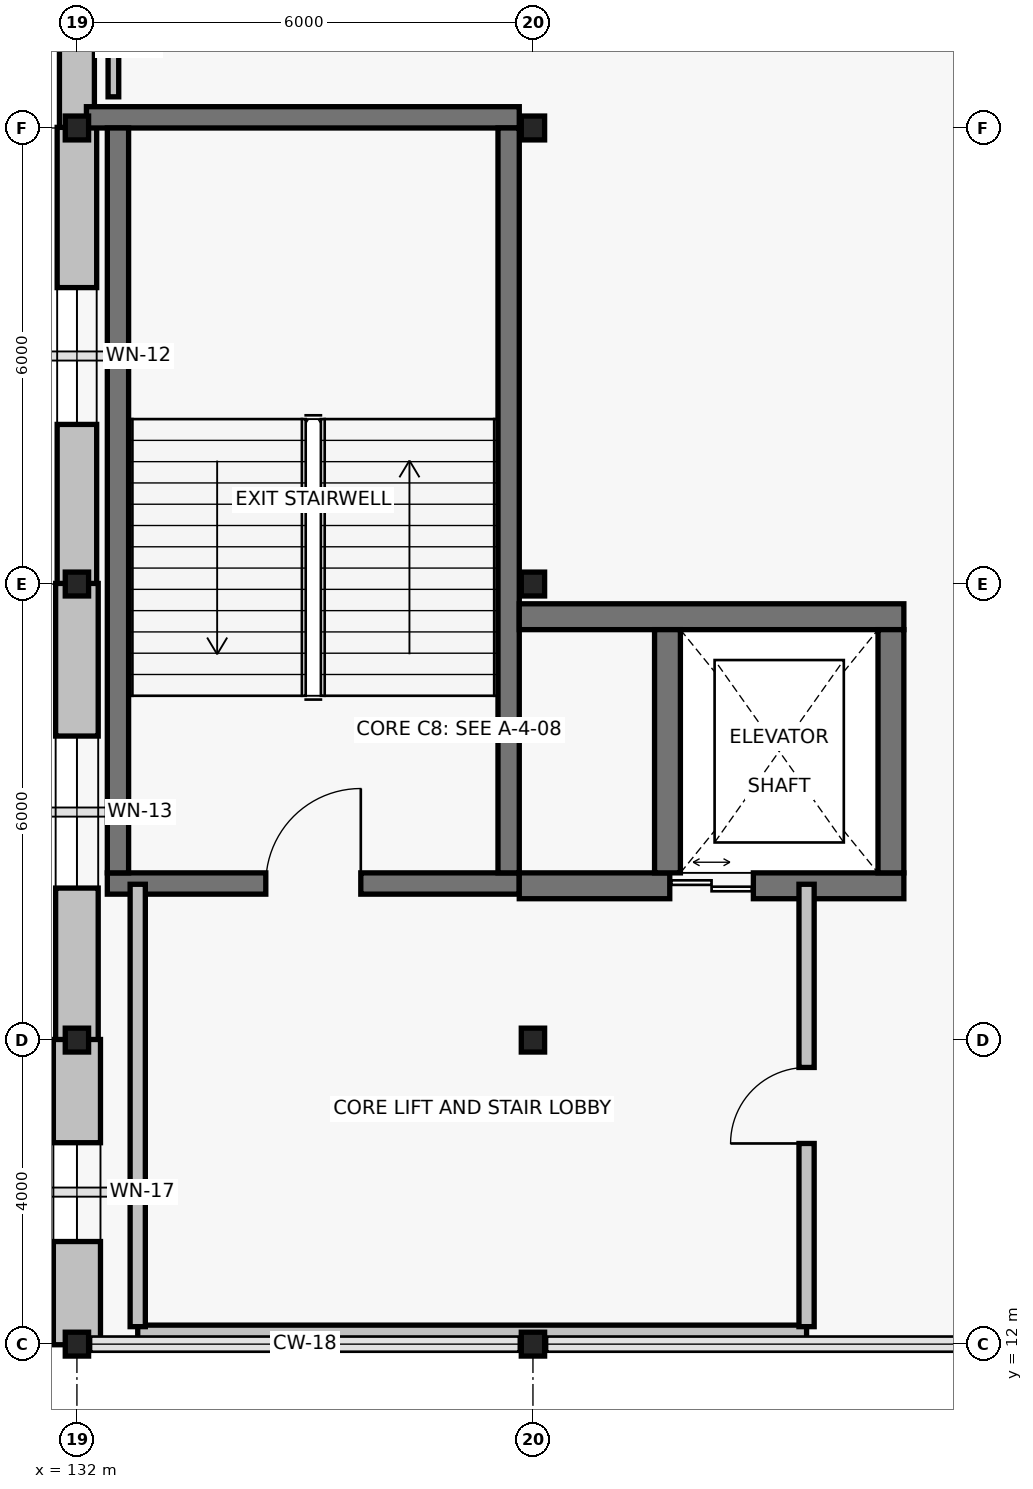
"""IFC4 building model, lengths in metres.
Left out: names, types, materials, properties, quantities, classifications, styles, units other than length and angle.
Written with IfcOpenShell. Run it as: python <this file> out.ifc"""

import sys

from ifc_helpers import new_model, si_unit, direction, frame, frame_2d, origin, origin_2d, place, context, subcontext, project, spatial, rectangle, i_section, extrude, element, fill, save


model = new_model("IFC4")
c1 = context("Model", 3, precision=1e-05, world=origin(), true_north=direction((0.0, 1.0)))
c2 = subcontext(c1, "Body", "Model", "MODEL_VIEW")
j1 = project(units=[si_unit("LENGTHUNIT", "METRE"), si_unit("PLANEANGLEUNIT", "RADIAN")], contexts=[c1])
p1 = place(None, origin())
s1 = spatial("IfcSite", under=j1, at=p1, CompositionType="ELEMENT")
p2 = place(p1, origin())
s2 = spatial("IfcBuilding", under=s1, at=p2, CompositionType="ELEMENT")
p3 = place(p2, frame((0.0, 0.0, 6.6)))
s3 = spatial("IfcBuildingStorey", under=s2, at=p3, CompositionType="ELEMENT", Elevation=6.6)
for number, where, z_axis, x_axis in (
    (1, (132.0, 12.0, 0.0), (0.0, 0.0, 1.0), (1.0, 0.0, 0.0)),
    (2, (132.0, 16.0, 0.0), (0.0, 0.0, 1.0), (1.0, 0.0, 0.0)),
    (3, (132.0, 22.0, 0.0), (0.0, 0.0, 1.0), (1.0, 0.0, 0.0)),
    (4, (132.0, 28.0, 0.0), (0.0, 0.0, 1.0), (1.0, 0.0, 0.0)),
    (5, (138.0, 12.0, 0.0), (0.0, 0.0, 1.0), (1.0, 0.0, 0.0)),
    (6, (138.0, 16.0, 0.0), (0.0, 0.0, 1.0), (1.0, 0.0, 0.0)),
    (7, (138.0, 22.0, 0.0), (0.0, 0.0, 1.0), (1.0, 0.0, 0.0)),
    (8, (138.0, 28.0, 0.0), (0.0, 0.0, 1.0), (1.0, 0.0, 0.0)),
):
    element("IfcColumn", number, at=place(p3, frame(where, z_axis=z_axis, x_axis=x_axis)), inside=s3, PredefinedType="COLUMN", context=c2, shape_type="SweptSolid", body=[
        extrude(i_section(OverallWidth=0.307, OverallDepth=0.314, WebThickness=0.012, FlangeThickness=0.019, FilletRadius=0.014, at=origin_2d()), origin(), (0.0, 0.0, 1.0), 4.8),
    ])
p4 = place(p3, frame((132.0, 34.008, 0.0), z_axis=(0.0, 0.0, 1.0), x_axis=(0.0, -1.0, 0.0)))
e9 = element("IfcWall", 9, at=p4, inside=s3, PredefinedType="SOLIDWALL", context=c2, shape_type="SweptSolid", body=[
    extrude(rectangle(XDim=6.016, YDim=0.46, at=frame_2d((3.008, 0.0))), origin(), (0.0, 0.0, 1.0), 3.911),
])
p5 = place(p4, frame((2.208, 0.0, 0.9)))
e10 = element("IfcOpeningElement", 10, at=p5, cuts=e9, PredefinedType="OPENING", context=c2, shape_type="SweptSolid", body=[
    extrude(rectangle(XDim=1.6, YDim=2.1, at=frame_2d((0.8, 1.05))), frame((0.0, 0.245, 0.0), z_axis=(0.0, -1.0, 0.0), x_axis=(1.0, 0.0, 0.0)), (0.0, 0.0, 1.0), 0.49),
])
p6 = place(p3, frame((132.0, 28.008, 0.0), z_axis=(0.0, 0.0, 1.0), x_axis=(0.0, -1.0, 0.0)))
e11 = element("IfcWall", 11, at=p6, inside=s3, PredefinedType="SOLIDWALL", context=c2, shape_type="SweptSolid", body=[
    extrude(rectangle(XDim=6.016, YDim=0.52, at=frame_2d((3.008, 0.0))), origin(), (0.0, 0.0, 1.0), 3.911),
])
p7 = place(p6, frame((2.108, 0.0, 0.9)))
e12 = element("IfcOpeningElement", 12, at=p7, cuts=e11, PredefinedType="OPENING", context=c2, shape_type="SweptSolid", body=[
    extrude(rectangle(XDim=1.8, YDim=2.1, at=frame_2d((0.9, 1.05))), frame((0.0, 0.275, 0.0), z_axis=(0.0, -1.0, 0.0), x_axis=(1.0, 0.0, 0.0)), (0.0, 0.0, 1.0), 0.55),
])
p8 = place(p3, frame((132.0, 22.008, 0.0), z_axis=(0.0, 0.0, 1.0), x_axis=(0.0, -1.0, 0.0)))
e13 = element("IfcWall", 13, at=p8, inside=s3, PredefinedType="SOLIDWALL", context=c2, shape_type="SweptSolid", body=[
    extrude(rectangle(XDim=6.016, YDim=0.56, at=frame_2d((3.008, 0.0))), origin(), (0.0, 0.0, 1.0), 3.911),
])
p9 = place(p8, frame((2.008, 0.0, 0.9)))
e14 = element("IfcOpeningElement", 14, at=p9, cuts=e13, PredefinedType="OPENING", context=c2, shape_type="SweptSolid", body=[
    extrude(rectangle(XDim=2.0, YDim=2.1, at=frame_2d((1.0, 1.05))), frame((0.0, 0.295, 0.0), z_axis=(0.0, -1.0, 0.0), x_axis=(1.0, 0.0, 0.0)), (0.0, 0.0, 1.0), 0.59),
])
p10 = place(p3, frame((132.0, 16.008, 0.0), z_axis=(0.0, 0.0, 1.0), x_axis=(0.0, -1.0, 0.0)))
e15 = element("IfcWall", 15, at=p10, inside=s3, PredefinedType="SOLIDWALL", context=c2, shape_type="SweptSolid", body=[
    extrude(rectangle(XDim=4.016, YDim=0.62, at=frame_2d((2.008, 0.0))), origin(), (0.0, 0.0, 1.0), 3.911),
])
p11 = place(p10, frame((1.358, 0.0, 0.9)))
e16 = element("IfcOpeningElement", 16, at=p11, cuts=e15, PredefinedType="OPENING", context=c2, shape_type="SweptSolid", body=[
    extrude(rectangle(XDim=1.3, YDim=2.4, at=frame_2d((0.65, 1.2))), frame((0.0, 0.325, 0.0), z_axis=(0.0, -1.0, 0.0), x_axis=(1.0, 0.0, 0.0)), (0.0, 0.0, 1.0), 0.65),
])
p12 = place(p3, frame((132.4, 18.06, 0.0), z_axis=(0.0, 0.0, 1.0), x_axis=(1.0, 0.0, 0.0)))
e17 = element("IfcWall", 17, at=p12, inside=s3, PredefinedType="SHEAR", context=c2, shape_type="SweptSolid", body=[
    extrude(rectangle(XDim=5.42, YDim=0.28, at=frame_2d((2.71, 0.0))), origin(), (0.0, 0.0, 1.0), 4.54),
])
p13 = place(p12, frame((2.085, 0.0, 0.0)))
e18 = element("IfcOpeningElement", 18, at=p13, cuts=e17, PredefinedType="OPENING", context=c2, shape_type="SweptSolid", body=[
    extrude(rectangle(XDim=1.25, YDim=2.2, at=frame_2d((0.625, 1.1))), frame((0.0, 0.155, 0.0), z_axis=(0.0, -1.0, 0.0), x_axis=(1.0, 0.0, 0.0)), (0.0, 0.0, 1.0), 0.31),
])
p14 = place(p3, frame((137.82, 28.14, 0.0), z_axis=(0.0, 0.0, 1.0), x_axis=(-1.0, 0.0, 0.0)))
e19 = element("IfcWall", 19, at=p14, inside=s3, PredefinedType="SHEAR", context=c2, shape_type="SweptSolid", body=[
    extrude(rectangle(XDim=5.695, YDim=0.28, at=frame_2d((2.848, 0.0))), origin(), (0.0, 0.0, 1.0), 4.54),
])
for number, where, z_axis, x_axis in (
    (20, (132.54, 28.0, 0.0), (0.0, 0.0, 1.0), (0.0, -1.0, 0.0)),
    (21, (137.68, 18.2, 0.0), (0.0, 0.0, 1.0), (0.0, 1.0, 0.0)),
):
    element("IfcWall", number, at=place(p3, frame(where, z_axis=z_axis, x_axis=x_axis)), inside=s3, PredefinedType="SHEAR", context=c2, shape_type="SweptSolid", body=[
        extrude(rectangle(XDim=9.8, YDim=0.28, at=frame_2d((4.9, 0.0))), origin(), (0.0, 0.0, 1.0), 4.54),
    ])
p15 = place(p3, frame((137.82, 18.03, 0.0), z_axis=(0.0, 0.0, 1.0), x_axis=(1.0, 0.0, 0.0)))
e22 = element("IfcWall", 22, at=p15, inside=s3, PredefinedType="SHEAR", context=c2, shape_type="SweptSolid", body=[
    extrude(rectangle(XDim=5.06, YDim=0.34, at=frame_2d((2.53, 0.0))), origin(), (0.0, 0.0, 1.0), 4.54),
])
p16 = place(p15, frame((1.98, 0.0, 0.0)))
e23 = element("IfcOpeningElement", 23, at=p16, cuts=e22, PredefinedType="OPENING", context=c2, shape_type="SweptSolid", body=[
    extrude(rectangle(XDim=1.1, YDim=2.2, at=frame_2d((0.55, 1.1))), frame((0.0, 0.185, 0.0), z_axis=(0.0, -1.0, 0.0), x_axis=(1.0, 0.0, 0.0)), (0.0, 0.0, 1.0), 0.37),
])
p17 = place(p3, frame((142.88, 21.57, 0.0), z_axis=(0.0, 0.0, 1.0), x_axis=(-1.0, 0.0, 0.0)))
e24 = element("IfcWall", 24, at=p17, inside=s3, PredefinedType="SHEAR", context=c2, shape_type="SweptSolid", body=[
    extrude(rectangle(XDim=5.06, YDim=0.34, at=frame_2d((2.53, 0.0))), origin(), (0.0, 0.0, 1.0), 4.54),
])
for number, where, z_axis, x_axis in (
    (25, (139.77, 21.4, 0.0), (0.0, 0.0, 1.0), (0.0, -1.0, 0.0)),
    (26, (142.71, 18.2, 0.0), (0.0, 0.0, 1.0), (0.0, 1.0, 0.0)),
):
    element("IfcWall", number, at=place(p3, frame(where, z_axis=z_axis, x_axis=x_axis)), inside=s3, PredefinedType="SHEAR", context=c2, shape_type="SweptSolid", body=[
        extrude(rectangle(XDim=3.2, YDim=0.34, at=frame_2d((1.6, 0.0))), origin(), (0.0, 0.0, 1.0), 4.54),
    ])
p18 = place(p3, frame((132.8, 12.15, 0.0), z_axis=(0.0, 0.0, 1.0), x_axis=(1.0, 0.0, 0.0)))
e27 = element("IfcWall", 27, at=p18, inside=s3, PredefinedType="PARTITIONING", context=c2, shape_type="SweptSolid", body=[
    extrude(rectangle(XDim=8.8, YDim=0.2, at=frame_2d((4.4, 0.0))), origin(), (0.0, 0.0, 1.0), 4.04),
])
p19 = place(p3, frame((132.8, 18.05, 0.0), z_axis=(0.0, 0.0, 1.0), x_axis=(0.0, -1.0, 0.0)))
e28 = element("IfcWall", 28, at=p19, inside=s3, PredefinedType="PARTITIONING", context=c2, shape_type="SweptSolid", body=[
    extrude(rectangle(XDim=5.82, YDim=0.2, at=frame_2d((2.91, 0.0))), origin(), (0.0, 0.0, 1.0), 4.04),
])
p20 = place(p3, frame((141.6, 12.23, 0.0), z_axis=(0.0, 0.0, 1.0), x_axis=(0.0, 1.0, 0.0)))
e29 = element("IfcWall", 29, at=p20, inside=s3, PredefinedType="PARTITIONING", context=c2, shape_type="SweptSolid", body=[
    extrude(rectangle(XDim=5.82, YDim=0.2, at=frame_2d((2.91, 0.0))), origin(), (0.0, 0.0, 1.0), 4.094),
])
p21 = place(p20, frame((2.41, 0.0, 0.0)))
e30 = element("IfcOpeningElement", 30, at=p21, cuts=e29, PredefinedType="OPENING", context=c2, shape_type="SweptSolid", body=[
    extrude(rectangle(XDim=1.0, YDim=2.15, at=frame_2d((0.5, 1.075))), frame((0.0, 0.115, 0.0), z_axis=(0.0, -1.0, 0.0), x_axis=(1.0, 0.0, 0.0)), (0.0, 0.0, 1.0), 0.23),
])
p22 = place(p3, frame((132.48, 28.41, 0.0), z_axis=(0.0, 0.0, 1.0), x_axis=(0.0, 1.0, 0.0)))
e31 = element("IfcWall", 31, at=p22, inside=s3, PredefinedType="PARTITIONING", context=c2, shape_type="SweptSolid", body=[
    extrude(rectangle(XDim=26.91, YDim=0.14, at=frame_2d((13.455, 0.0))), origin(), (0.0, 0.0, 1.0), 3.911),
])
p23 = place(p22, frame((22.007, 0.0, 0.0)))
e32 = element("IfcOpeningElement", 32, at=p23, cuts=e31, PredefinedType="OPENING", context=c2, shape_type="SweptSolid", body=[
    extrude(rectangle(XDim=1.02, YDim=2.1, at=frame_2d((0.51, 1.05))), frame((0.0, 0.085, 0.0), z_axis=(0.0, -1.0, 0.0), x_axis=(1.0, 0.0, 0.0)), (0.0, 0.0, 1.0), 0.17),
])
p24 = place(p7, origin())
e33 = element("IfcWindow", 33, at=p24, inside=s3, PartitioningType="SINGLE_PANEL", PredefinedType="WINDOW", context=c2, shape_type="SweptSolid", body=[
    extrude(rectangle(XDim=1.8, YDim=2.1, at=frame_2d((0.9, 1.05))), frame((0.0, 0.03, 0.0), z_axis=(0.0, -1.0, 0.0), x_axis=(1.0, 0.0, 0.0)), (0.0, 0.0, 1.0), 0.06),
])
fill(e12, e33)
p25 = place(p9, origin())
e34 = element("IfcWindow", 34, at=p25, inside=s3, PartitioningType="SINGLE_PANEL", PredefinedType="WINDOW", context=c2, shape_type="SweptSolid", body=[
    extrude(rectangle(XDim=2.0, YDim=2.1, at=frame_2d((1.0, 1.05))), frame((0.0, 0.03, 0.0), z_axis=(0.0, -1.0, 0.0), x_axis=(1.0, 0.0, 0.0)), (0.0, 0.0, 1.0), 0.06),
])
fill(e14, e34)
p26 = place(p11, origin())
e35 = element("IfcWindow", 35, at=p26, inside=s3, PartitioningType="SINGLE_PANEL", PredefinedType="WINDOW", context=c2, shape_type="SweptSolid", body=[
    extrude(rectangle(XDim=1.3, YDim=2.4, at=frame_2d((0.65, 1.2))), frame((0.0, 0.03, 0.0), z_axis=(0.0, -1.0, 0.0), x_axis=(1.0, 0.0, 0.0)), (0.0, 0.0, 1.0), 0.06),
])
fill(e16, e35)
p27 = place(p13, origin())
e36 = element("IfcDoor", 36, at=p27, inside=s3, OperationType="SINGLE_SWING_RIGHT", PredefinedType="DOOR", context=c2, shape_type="SweptSolid", body=[
    extrude(rectangle(XDim=1.25, YDim=2.2, at=frame_2d((0.625, 1.1))), frame((0.0, 0.025, 0.0), z_axis=(0.0, -1.0, 0.0), x_axis=(1.0, 0.0, 0.0)), (0.0, 0.0, 1.0), 0.05),
])
fill(e18, e36)
p28 = place(p16, origin())
e37 = element("IfcDoor", 37, at=p28, inside=s3, OperationType="DOUBLE_DOOR_SLIDING", PredefinedType="DOOR", context=c2, shape_type="SweptSolid", body=[
    extrude(rectangle(XDim=1.1, YDim=2.2, at=frame_2d((0.55, 1.1))), frame((0.0, 0.025, 0.0), z_axis=(0.0, -1.0, 0.0), x_axis=(1.0, 0.0, 0.0)), (0.0, 0.0, 1.0), 0.05),
])
fill(e23, e37)
p29 = place(p21, origin())
e38 = element("IfcDoor", 38, at=p29, inside=s3, OperationType="SINGLE_SWING_LEFT", PredefinedType="DOOR", context=c2, shape_type="SweptSolid", body=[
    extrude(rectangle(XDim=1.0, YDim=2.15, at=frame_2d((0.5, 1.075))), frame((0.0, 0.025, 0.0), z_axis=(0.0, -1.0, 0.0), x_axis=(1.0, 0.0, 0.0)), (0.0, 0.0, 1.0), 0.05),
])
fill(e30, e38)
save(model, sys.argv[1])
